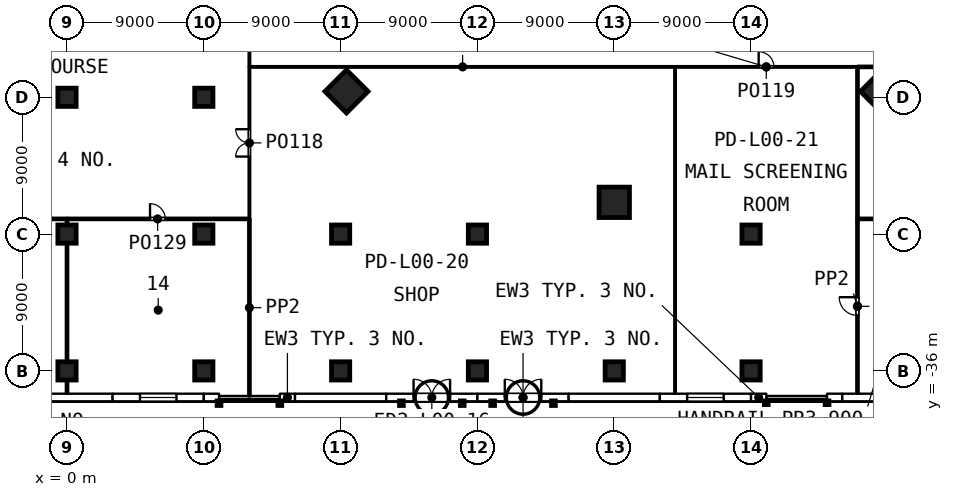
"""IFC4 building model, lengths in metres.
Left out: names, types, materials, properties, quantities, classifications, styles, units other than length and angle.
Written with IfcOpenShell. Run it as: python <this file> out.ifc"""

import sys

from ifc_helpers import new_model, si_unit, direction, frame, frame_2d, origin, origin_2d, place, context, subcontext, project, spatial, rectangle, extrude, element, fill, save


model = new_model("IFC4")
c1 = context("Model", 3, precision=1e-05, world=origin(), true_north=direction((0.0, 1.0)))
c2 = subcontext(c1, "Body", "Model", "MODEL_VIEW")
j1 = project(units=[si_unit("LENGTHUNIT", "METRE"), si_unit("PLANEANGLEUNIT", "RADIAN")], contexts=[c1])
p1 = place(None, origin())
s1 = spatial("IfcSite", under=j1, at=p1, CompositionType="ELEMENT")
p2 = place(p1, origin())
s2 = spatial("IfcBuilding", under=s1, at=p2, CompositionType="ELEMENT")
p3 = place(p2, origin())
s3 = spatial("IfcBuildingStorey", under=s2, at=p3, CompositionType="ELEMENT", Elevation=0.0)
for number, where, z_axis, x_axis in (
    (1, (0.0, -36.0, 0.0), (0.0, 0.0, 1.0), (1.0, 0.0, 0.0)),
    (2, (0.0, -27.0, 0.0), (0.0, 0.0, 1.0), (1.0, 0.0, 0.0)),
    (3, (0.0, -18.0, 0.0), (0.0, 0.0, 1.0), (1.0, 0.0, 0.0)),
    (4, (9.0, -36.0, 0.0), (0.0, 0.0, 1.0), (1.0, 0.0, 0.0)),
    (5, (9.0, -27.0, 0.0), (0.0, 0.0, 1.0), (1.0, 0.0, 0.0)),
    (6, (9.0, -18.0, 0.0), (0.0, 0.0, 1.0), (1.0, 0.0, 0.0)),
    (7, (18.0, -36.0, 0.0), (0.0, 0.0, 1.0), (1.0, 0.0, 0.0)),
    (8, (18.0, -27.0, 0.0), (0.0, 0.0, 1.0), (1.0, 0.0, 0.0)),
    (9, (27.0, -36.0, 0.0), (0.0, 0.0, 1.0), (1.0, 0.0, 0.0)),
    (10, (27.0, -27.0, 0.0), (0.0, 0.0, 1.0), (1.0, 0.0, 0.0)),
    (11, (36.0, -36.0, 0.0), (0.0, 0.0, 1.0), (1.0, 0.0, 0.0)),
    (12, (45.0, -36.0, 0.0), (0.0, 0.0, 1.0), (1.0, 0.0, 0.0)),
    (13, (45.0, -27.0, 0.0), (0.0, 0.0, 1.0), (1.0, 0.0, 0.0)),
):
    element("IfcColumn", number, at=place(p3, frame(where, z_axis=z_axis, x_axis=x_axis)), inside=s3, PredefinedType="COLUMN", context=c2, shape_type="SweptSolid", body=[
        extrude(rectangle(XDim=1.2, YDim=1.2, at=origin_2d()), origin(), (0.0, 0.0, 1.0), 7.2),
    ])
for number, where, z_axis, x_axis in (
    (14, (18.386, -17.614, 0.0), (0.0, 0.0, 1.0), (-0.707, -0.707, 0.0)),
    (15, (36.0, -24.91, 0.0), (0.0, 0.0, 1.0), (0.0, -1.0, 0.0)),
    (16, (53.614, -17.614, 0.0), (0.0, 0.0, 1.0), (0.707, -0.707, 0.0)),
):
    element("IfcColumn", number, at=place(p3, frame(where, z_axis=z_axis, x_axis=x_axis)), inside=s3, PredefinedType="COLUMN", context=c2, shape_type="SweptSolid", body=[
        extrude(rectangle(XDim=2.0, YDim=2.0, at=origin_2d()), origin(), (0.0, 0.0, 1.0), 7.2),
    ])
p4 = place(p3, frame((-3.0, -37.75, 0.0), z_axis=(0.0, 0.0, 1.0), x_axis=(1.0, 0.0, 0.0)))
e17 = element("IfcWall", 17, at=p4, inside=s3, PredefinedType="SOLIDWALL", context=c2, shape_type="SweptSolid", body=[
    extrude(rectangle(XDim=6.0, YDim=0.5, at=frame_2d((3.0, 0.0))), origin(), (0.0, 0.0, 1.0), 6.9),
])
p5 = place(p3, frame((3.0, -37.75, 0.0), z_axis=(0.0, 0.0, 1.0), x_axis=(1.0, 0.0, 0.0)))
e18 = element("IfcWall", 18, at=p5, inside=s3, PredefinedType="SOLIDWALL", context=c2, shape_type="SweptSolid", body=[
    extrude(rectangle(XDim=6.0, YDim=0.5, at=frame_2d((3.0, 0.0))), origin(), (0.0, 0.0, 1.0), 6.9),
])
p6 = place(p5, frame((1.8, 0.0, 0.9)))
e19 = element("IfcOpeningElement", 19, at=p6, cuts=e18, PredefinedType="OPENING", context=c2, shape_type="SweptSolid", body=[
    extrude(rectangle(XDim=2.4, YDim=3.6, at=frame_2d((1.2, 1.8))), frame((0.0, 0.26, 0.0), z_axis=(0.0, -1.0, 0.0), x_axis=(1.0, 0.0, 0.0)), (0.0, 0.0, 1.0), 0.52),
])
for number, where, z_axis, x_axis in (
    (20, (9.0, -37.75, 0.0), (0.0, 0.0, 1.0), (1.0, 0.0, 0.0)),
    (21, (14.0, -37.75, 0.0), (0.0, 0.0, 1.0), (1.0, 0.0, 0.0)),
):
    element("IfcWall", number, at=place(p3, frame(where, z_axis=z_axis, x_axis=x_axis)), inside=s3, PredefinedType="SOLIDWALL", context=c2, shape_type="SweptSolid", body=[
        extrude(rectangle(XDim=1.0, YDim=0.5, at=frame_2d((0.5, 0.0))), origin(), (0.0, 0.0, 1.0), 6.9),
    ])
p7 = place(p3, frame((15.0, -37.75, 0.0), z_axis=(0.0, 0.0, 1.0), x_axis=(1.0, 0.0, 0.0)))
e22 = element("IfcWall", 22, at=p7, inside=s3, PredefinedType="SOLIDWALL", context=c2, shape_type="SweptSolid", body=[
    extrude(rectangle(XDim=6.0, YDim=0.5, at=frame_2d((3.0, 0.0))), origin(), (0.0, 0.0, 1.0), 6.9),
])
p8 = place(p3, frame((21.0, -37.75, 0.0), z_axis=(0.0, 0.0, 1.0), x_axis=(1.0, 0.0, 0.0)))
e23 = element("IfcWall", 23, at=p8, inside=s3, PredefinedType="SOLIDWALL", context=c2, shape_type="SweptSolid", body=[
    extrude(rectangle(XDim=6.0, YDim=0.5, at=frame_2d((3.0, 0.0))), origin(), (0.0, 0.0, 1.0), 6.9),
])
p9 = place(p8, frame((1.8, 0.0, 0.0)))
e24 = element("IfcOpeningElement", 24, at=p9, cuts=e23, PredefinedType="OPENING", context=c2, shape_type="SweptSolid", body=[
    extrude(rectangle(XDim=2.4, YDim=3.0, at=frame_2d((1.2, 1.5))), frame((0.0, 0.26, 0.0), z_axis=(0.0, -1.0, 0.0), x_axis=(1.0, 0.0, 0.0)), (0.0, 0.0, 1.0), 0.52),
])
p10 = place(p3, frame((27.0, -37.75, 0.0), z_axis=(0.0, 0.0, 1.0), x_axis=(1.0, 0.0, 0.0)))
e25 = element("IfcWall", 25, at=p10, inside=s3, PredefinedType="SOLIDWALL", context=c2, shape_type="SweptSolid", body=[
    extrude(rectangle(XDim=6.0, YDim=0.5, at=frame_2d((3.0, 0.0))), origin(), (0.0, 0.0, 1.0), 6.9),
])
p11 = place(p10, frame((1.8, 0.0, 0.0)))
e26 = element("IfcOpeningElement", 26, at=p11, cuts=e25, PredefinedType="OPENING", context=c2, shape_type="SweptSolid", body=[
    extrude(rectangle(XDim=2.4, YDim=3.0, at=frame_2d((1.2, 1.5))), frame((0.0, 0.26, 0.0), z_axis=(0.0, -1.0, 0.0), x_axis=(1.0, 0.0, 0.0)), (0.0, 0.0, 1.0), 0.52),
])
p12 = place(p3, frame((33.0, -37.75, 0.0), z_axis=(0.0, 0.0, 1.0), x_axis=(1.0, 0.0, 0.0)))
e27 = element("IfcWall", 27, at=p12, inside=s3, PredefinedType="SOLIDWALL", context=c2, shape_type="SweptSolid", body=[
    extrude(rectangle(XDim=6.0, YDim=0.5, at=frame_2d((3.0, 0.0))), origin(), (0.0, 0.0, 1.0), 6.9),
])
p13 = place(p3, frame((39.0, -37.75, 0.0), z_axis=(0.0, 0.0, 1.0), x_axis=(1.0, 0.0, 0.0)))
e28 = element("IfcWall", 28, at=p13, inside=s3, PredefinedType="SOLIDWALL", context=c2, shape_type="SweptSolid", body=[
    extrude(rectangle(XDim=6.0, YDim=0.5, at=frame_2d((3.0, 0.0))), origin(), (0.0, 0.0, 1.0), 6.9),
])
p14 = place(p13, frame((1.8, 0.0, 0.9)))
e29 = element("IfcOpeningElement", 29, at=p14, cuts=e28, PredefinedType="OPENING", context=c2, shape_type="SweptSolid", body=[
    extrude(rectangle(XDim=2.4, YDim=3.6, at=frame_2d((1.2, 1.8))), frame((0.0, 0.26, 0.0), z_axis=(0.0, -1.0, 0.0), x_axis=(1.0, 0.0, 0.0)), (0.0, 0.0, 1.0), 0.52),
])
for number, where, z_axis, x_axis in (
    (30, (45.0, -37.75, 0.0), (0.0, 0.0, 1.0), (1.0, 0.0, 0.0)),
    (31, (50.0, -37.75, 0.0), (0.0, 0.0, 1.0), (1.0, 0.0, 0.0)),
):
    element("IfcWall", number, at=place(p3, frame(where, z_axis=z_axis, x_axis=x_axis)), inside=s3, PredefinedType="SOLIDWALL", context=c2, shape_type="SweptSolid", body=[
        extrude(rectangle(XDim=1.0, YDim=0.5, at=frame_2d((0.5, 0.0))), origin(), (0.0, 0.0, 1.0), 6.9),
    ])
p15 = place(p3, frame((51.0, -37.75, 0.0), z_axis=(0.0, 0.0, 1.0), x_axis=(1.0, 0.0, 0.0)))
e32 = element("IfcWall", 32, at=p15, inside=s3, PredefinedType="SOLIDWALL", context=c2, shape_type="SweptSolid", body=[
    extrude(rectangle(XDim=6.0, YDim=0.5, at=frame_2d((3.0, 0.0))), origin(), (0.0, 0.0, 1.0), 6.9),
])
p16 = place(p3, frame((12.0, -16.0, 0.0), z_axis=(0.0, 0.0, 1.0), x_axis=(0.0, 1.0, 0.0)))
e33 = element("IfcWall", 33, at=p16, inside=s3, PredefinedType="PARTITIONING", context=c2, shape_type="SweptSolid", body=[
    extrude(rectangle(XDim=6.0, YDim=0.1, at=frame_2d((3.0, 0.0))), origin(), (0.0, 0.0, 1.0), 6.9),
])
p17 = place(p3, frame((12.0, -26.0, 0.0), z_axis=(0.0, 0.0, 1.0), x_axis=(0.0, 1.0, 0.0)))
e34 = element("IfcWall", 34, at=p17, inside=s3, PredefinedType="PARTITIONING", context=c2, shape_type="SweptSolid", body=[
    extrude(rectangle(XDim=10.0, YDim=0.1, at=frame_2d((5.0, 0.0))), origin(), (0.0, 0.0, 1.0), 6.9),
])
p18 = place(p17, frame((4.1, 0.0, 0.0)))
e35 = element("IfcOpeningElement", 35, at=p18, cuts=e34, PredefinedType="OPENING", context=c2, shape_type="SweptSolid", body=[
    extrude(rectangle(XDim=1.8, YDim=2.1, at=frame_2d((0.9, 1.05))), frame((0.0, 0.06, 0.0), z_axis=(0.0, -1.0, 0.0), x_axis=(1.0, 0.0, 0.0)), (0.0, 0.0, 1.0), 0.12),
])
p19 = place(p3, frame((-11.925, -26.0, 0.0), z_axis=(0.0, 0.0, 1.0), x_axis=(1.0, 0.0, 0.0)))
e36 = element("IfcWall", 36, at=p19, inside=s3, PredefinedType="PARTITIONING", context=c2, shape_type="SweptSolid", body=[
    extrude(rectangle(XDim=11.925, YDim=0.15, at=frame_2d((5.962, 0.0))), origin(), (0.0, 0.0, 1.0), 6.9),
])
p20 = place(p19, frame((5.363, 0.0, 0.0)))
e37 = element("IfcOpeningElement", 37, at=p20, cuts=e36, PredefinedType="OPENING", context=c2, shape_type="SweptSolid", body=[
    extrude(rectangle(XDim=1.2, YDim=2.1, at=frame_2d((0.6, 1.05))), frame((0.0, 0.085, 0.0), z_axis=(0.0, -1.0, 0.0), x_axis=(1.0, 0.0, 0.0)), (0.0, 0.0, 1.0), 0.17),
])
p21 = place(p3, frame((0.0, -26.0, 0.0), z_axis=(0.0, 0.0, 1.0), x_axis=(1.0, 0.0, 0.0)))
e38 = element("IfcWall", 38, at=p21, inside=s3, PredefinedType="PARTITIONING", context=c2, shape_type="SweptSolid", body=[
    extrude(rectangle(XDim=11.925, YDim=0.15, at=frame_2d((5.962, 0.0))), origin(), (0.0, 0.0, 1.0), 6.9),
])
p22 = place(p21, frame((5.462, 0.0, 0.0)))
e39 = element("IfcOpeningElement", 39, at=p22, cuts=e38, PredefinedType="OPENING", context=c2, shape_type="SweptSolid", body=[
    extrude(rectangle(XDim=1.0, YDim=2.1, at=frame_2d((0.5, 1.05))), frame((0.0, 0.085, 0.0), z_axis=(0.0, -1.0, 0.0), x_axis=(1.0, 0.0, 0.0)), (0.0, 0.0, 1.0), 0.17),
])
p23 = place(p3, frame((12.05, -16.0, 0.0), z_axis=(0.0, 0.0, 1.0), x_axis=(1.0, 0.0, 0.0)))
e40 = element("IfcWall", 40, at=p23, inside=s3, PredefinedType="PARTITIONING", context=c2, shape_type="SweptSolid", body=[
    extrude(rectangle(XDim=27.95, YDim=0.1, at=frame_2d((13.975, 0.0))), origin(), (0.0, 0.0, 1.0), 6.9),
])
p24 = place(p3, frame((40.0, -16.0, 0.0), z_axis=(0.0, 0.0, 1.0), x_axis=(1.0, 0.0, 0.0)))
e41 = element("IfcWall", 41, at=p24, inside=s3, PredefinedType="PARTITIONING", context=c2, shape_type="SweptSolid", body=[
    extrude(rectangle(XDim=12.0, YDim=0.1, at=frame_2d((6.0, 0.0))), origin(), (0.0, 0.0, 1.0), 6.9),
])
p25 = place(p24, frame((5.5, 0.0, 0.0)))
e42 = element("IfcOpeningElement", 42, at=p25, cuts=e41, PredefinedType="OPENING", context=c2, shape_type="SweptSolid", body=[
    extrude(rectangle(XDim=1.0, YDim=2.1, at=frame_2d((0.5, 1.05))), frame((0.0, 0.06, 0.0), z_axis=(0.0, -1.0, 0.0), x_axis=(1.0, 0.0, 0.0)), (0.0, 0.0, 1.0), 0.12),
])
p26 = place(p3, frame((52.0, -16.0, 0.0), z_axis=(0.0, 0.0, 1.0), x_axis=(1.0, 0.0, 0.0)))
e43 = element("IfcWall", 43, at=p26, inside=s3, PredefinedType="PARTITIONING", context=c2, shape_type="SweptSolid", body=[
    extrude(rectangle(XDim=4.8, YDim=0.15, at=frame_2d((2.4, 0.0))), origin(), (0.0, 0.0, 1.0), 6.9),
])
p27 = place(p3, frame((40.0, -37.5, 0.0), z_axis=(0.0, 0.0, 1.0), x_axis=(0.0, 1.0, 0.0)))
e44 = element("IfcWall", 44, at=p27, inside=s3, PredefinedType="PARTITIONING", context=c2, shape_type="SweptSolid", body=[
    extrude(rectangle(XDim=21.45, YDim=0.1, at=frame_2d((10.725, 0.0))), origin(), (0.0, 0.0, 1.0), 6.9),
])
p28 = place(p3, frame((12.0, -37.68, 0.0), z_axis=(0.0, 0.0, 1.0), x_axis=(0.0, 1.0, 0.0)))
e45 = element("IfcWall", 45, at=p28, inside=s3, PredefinedType="PARTITIONING", context=c2, shape_type="SweptSolid", body=[
    extrude(rectangle(XDim=11.68, YDim=0.15, at=frame_2d((5.84, 0.0))), origin(), (0.0, 0.0, 1.0), 6.9),
])
p29 = place(p3, frame((52.0, -37.5, 0.0), z_axis=(0.0, 0.0, 1.0), x_axis=(0.0, 1.0, 0.0)))
e46 = element("IfcWall", 46, at=p29, inside=s3, PredefinedType="PARTITIONING", context=c2, shape_type="SweptSolid", body=[
    extrude(rectangle(XDim=11.5, YDim=0.15, at=frame_2d((5.75, 0.0))), origin(), (0.0, 0.0, 1.0), 6.9),
])
p30 = place(p29, frame((5.15, 0.0, 0.0)))
e47 = element("IfcOpeningElement", 47, at=p30, cuts=e46, PredefinedType="OPENING", context=c2, shape_type="SweptSolid", body=[
    extrude(rectangle(XDim=1.2, YDim=2.1, at=frame_2d((0.6, 1.05))), frame((0.0, 0.085, 0.0), z_axis=(0.0, -1.0, 0.0), x_axis=(1.0, 0.0, 0.0)), (0.0, 0.0, 1.0), 0.17),
])
p31 = place(p3, frame((52.0, -26.0, 0.0), z_axis=(0.0, 0.0, 1.0), x_axis=(0.0, 1.0, 0.0)))
e48 = element("IfcWall", 48, at=p31, inside=s3, PredefinedType="PARTITIONING", context=c2, shape_type="SweptSolid", body=[
    extrude(rectangle(XDim=9.925, YDim=0.15, at=frame_2d((4.962, 0.0))), origin(), (0.0, 0.0, 1.0), 6.9),
])
p32 = place(p3, frame((52.075, -26.0, 0.0), z_axis=(0.0, 0.0, 1.0), x_axis=(1.0, 0.0, 0.0)))
e49 = element("IfcWall", 49, at=p32, inside=s3, PredefinedType="PARTITIONING", context=c2, shape_type="SweptSolid", body=[
    extrude(rectangle(XDim=22.425, YDim=0.15, at=frame_2d((11.212, 0.0))), origin(), (0.0, 0.0, 1.0), 6.9),
])
p33 = place(p32, frame((12.159, 0.0, 0.0)))
e50 = element("IfcOpeningElement", 50, at=p33, cuts=e49, PredefinedType="OPENING", context=c2, shape_type="SweptSolid", body=[
    extrude(rectangle(XDim=1.2, YDim=2.1, at=frame_2d((0.6, 1.05))), frame((0.0, 0.085, 0.0), z_axis=(0.0, -1.0, 0.0), x_axis=(1.0, 0.0, 0.0)), (0.0, 0.0, 1.0), 0.17),
])
p34 = place(p3, frame((0.0, -37.5, 0.0), z_axis=(0.0, 0.0, 1.0), x_axis=(0.0, 1.0, 0.0)))
e51 = element("IfcWall", 51, at=p34, inside=s3, PredefinedType="PARTITIONING", context=c2, shape_type="SweptSolid", body=[
    extrude(rectangle(XDim=11.425, YDim=0.15, at=frame_2d((5.712, 0.0))), origin(), (0.0, 0.0, 1.0), 5.91),
])
p35 = place(p6, origin())
e52 = element("IfcWindow", 52, at=p35, inside=s3, PartitioningType="SINGLE_PANEL", PredefinedType="WINDOW", context=c2, shape_type="SweptSolid", body=[
    extrude(rectangle(XDim=2.4, YDim=3.6, at=frame_2d((1.2, 1.8))), frame((0.0, 0.03, 0.0), z_axis=(0.0, -1.0, 0.0), x_axis=(1.0, 0.0, 0.0)), (0.0, 0.0, 1.0), 0.06),
])
fill(e19, e52)
p36 = place(p9, origin())
e53 = element("IfcDoor", 53, at=p36, inside=s3, OperationType="SINGLE_SWING_LEFT", PredefinedType="DOOR", context=c2, shape_type="SweptSolid", body=[
    extrude(rectangle(XDim=2.4, YDim=3.0, at=frame_2d((1.2, 1.5))), frame((0.0, 0.025, 0.0), z_axis=(0.0, -1.0, 0.0), x_axis=(1.0, 0.0, 0.0)), (0.0, 0.0, 1.0), 0.05),
])
fill(e24, e53)
p37 = place(p11, origin())
e54 = element("IfcDoor", 54, at=p37, inside=s3, OperationType="SINGLE_SWING_LEFT", PredefinedType="DOOR", context=c2, shape_type="SweptSolid", body=[
    extrude(rectangle(XDim=2.4, YDim=3.0, at=frame_2d((1.2, 1.5))), frame((0.0, 0.025, 0.0), z_axis=(0.0, -1.0, 0.0), x_axis=(1.0, 0.0, 0.0)), (0.0, 0.0, 1.0), 0.05),
])
fill(e26, e54)
p38 = place(p14, origin())
e55 = element("IfcWindow", 55, at=p38, inside=s3, PartitioningType="SINGLE_PANEL", PredefinedType="WINDOW", context=c2, shape_type="SweptSolid", body=[
    extrude(rectangle(XDim=2.4, YDim=3.6, at=frame_2d((1.2, 1.8))), frame((0.0, 0.03, 0.0), z_axis=(0.0, -1.0, 0.0), x_axis=(1.0, 0.0, 0.0)), (0.0, 0.0, 1.0), 0.06),
])
fill(e29, e55)
p39 = place(p18, origin())
e56 = element("IfcDoor", 56, at=p39, inside=s3, OperationType="DOUBLE_DOOR_DOUBLE_SWING", PredefinedType="DOOR", context=c2, shape_type="SweptSolid", body=[
    extrude(rectangle(XDim=1.8, YDim=2.1, at=frame_2d((0.9, 1.05))), frame((0.0, 0.025, 0.0), z_axis=(0.0, -1.0, 0.0), x_axis=(1.0, 0.0, 0.0)), (0.0, 0.0, 1.0), 0.05),
])
fill(e35, e56)
p40 = place(p25, origin())
e57 = element("IfcDoor", 57, at=p40, inside=s3, OperationType="SINGLE_SWING_LEFT", PredefinedType="DOOR", context=c2, shape_type="SweptSolid", body=[
    extrude(rectangle(XDim=1.0, YDim=2.1, at=frame_2d((0.5, 1.05))), frame((0.0, 0.025, 0.0), z_axis=(0.0, -1.0, 0.0), x_axis=(1.0, 0.0, 0.0)), (0.0, 0.0, 1.0), 0.05),
])
fill(e42, e57)
p41 = place(p30, origin())
e58 = element("IfcDoor", 58, at=p41, inside=s3, OperationType="SINGLE_SWING_RIGHT", PredefinedType="DOOR", context=c2, shape_type="SweptSolid", body=[
    extrude(rectangle(XDim=1.2, YDim=2.1, at=frame_2d((0.6, 1.05))), frame((0.0, 0.025, 0.0), z_axis=(0.0, -1.0, 0.0), x_axis=(1.0, 0.0, 0.0)), (0.0, 0.0, 1.0), 0.05),
])
fill(e47, e58)
p42 = place(p22, origin())
e59 = element("IfcDoor", 59, at=p42, inside=s3, OperationType="SINGLE_SWING_LEFT", PredefinedType="DOOR", context=c2, shape_type="SweptSolid", body=[
    extrude(rectangle(XDim=1.0, YDim=2.1, at=frame_2d((0.5, 1.05))), frame((0.0, 0.025, 0.0), z_axis=(0.0, -1.0, 0.0), x_axis=(1.0, 0.0, 0.0)), (0.0, 0.0, 1.0), 0.05),
])
fill(e39, e59)
save(model, sys.argv[1])
